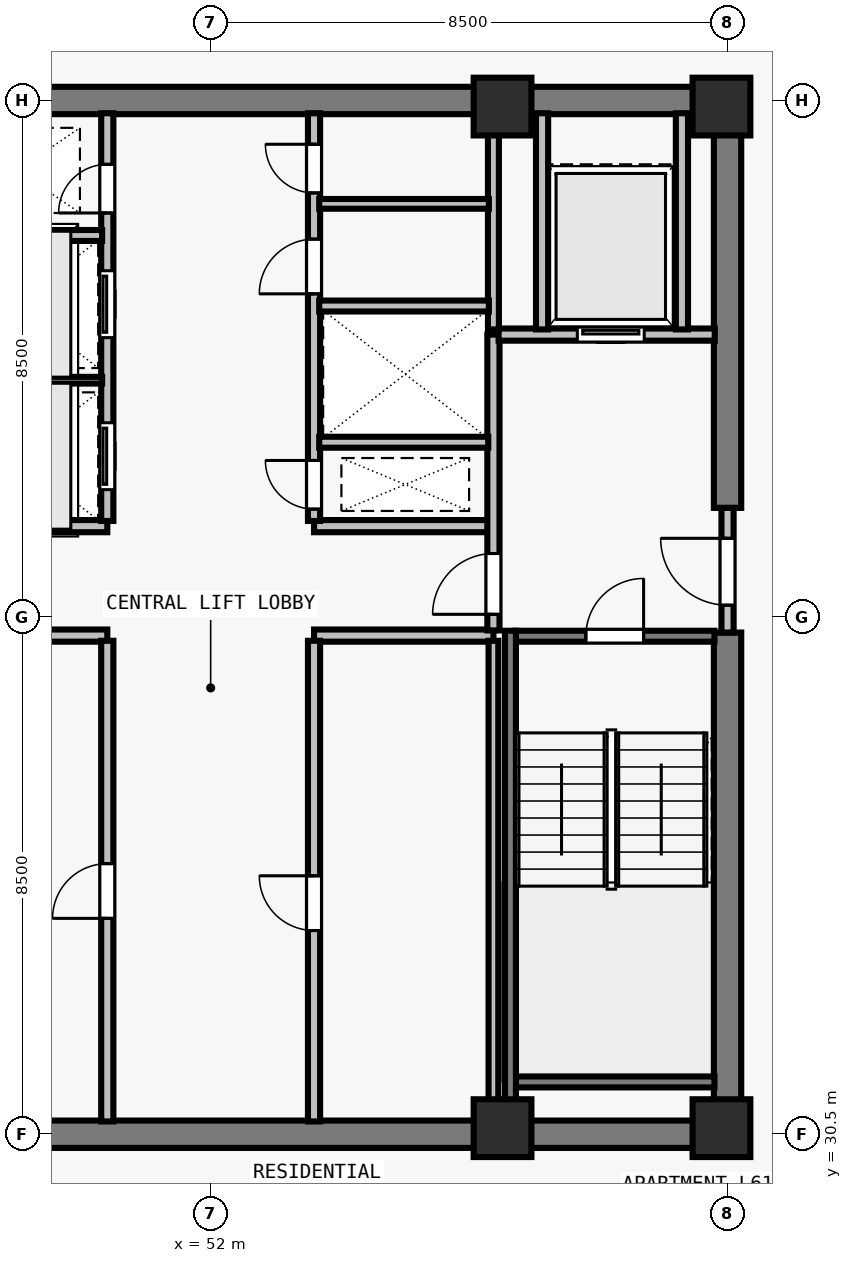
"""IFC4 building model, lengths in metres.
Left out: names, types, materials, properties, quantities, classifications, styles, units other than length and angle.
Written with IfcOpenShell. Run it as: python <this file> out.ifc"""

import sys

from ifc_helpers import new_model, si_unit, direction, frame, frame_2d, origin, origin_2d, place, context, subcontext, project, spatial, rectangle, extrude, element, fill, save


model = new_model("IFC4")
c1 = context("Model", 3, precision=1e-05, world=origin(), true_north=direction((0.0, 1.0)))
c2 = subcontext(c1, "Body", "Model", "MODEL_VIEW")
j1 = project(units=[si_unit("LENGTHUNIT", "METRE"), si_unit("PLANEANGLEUNIT", "RADIAN")], contexts=[c1])
p1 = place(None, origin())
s1 = spatial("IfcSite", under=j1, at=p1, CompositionType="ELEMENT")
p2 = place(p1, origin())
s2 = spatial("IfcBuilding", under=s1, at=p2, CompositionType="ELEMENT")
p3 = place(p2, frame((0.0, 0.0, 223.5)))
s3 = spatial("IfcBuildingStorey", under=s2, at=p3, CompositionType="ELEMENT", Elevation=223.5)
for number, where, z_axis, x_axis in (
    (1, (56.8, 30.6, 0.0), (0.0, 0.0, 1.0), (1.0, 0.0, 0.0)),
    (2, (60.4, 30.6, 0.0), (0.0, 0.0, 1.0), (1.0, 0.0, 0.0)),
    (3, (56.8, 47.4, 0.0), (0.0, 0.0, 1.0), (1.0, 0.0, 0.0)),
    (4, (60.4, 47.4, 0.0), (0.0, 0.0, 1.0), (1.0, 0.0, 0.0)),
):
    element("IfcColumn", number, at=place(p3, frame(where, z_axis=z_axis, x_axis=x_axis)), inside=s3, PredefinedType="COLUMN", context=c2, shape_type="SweptSolid", body=[
        extrude(rectangle(XDim=0.95, YDim=0.95, at=origin_2d()), origin(), (0.0, 0.0, 1.0), 3.5),
    ])
for number, where, z_axis, x_axis in (
    (5, (43.275, 30.5, 0.0), (0.0, 0.0, 1.0), (1.0, 0.0, 0.0)),
    (6, (43.275, 47.5, 0.0), (0.0, 0.0, 1.0), (1.0, 0.0, 0.0)),
):
    element("IfcWall", number, at=place(p3, frame(where, z_axis=z_axis, x_axis=x_axis)), inside=s3, PredefinedType="SHEAR", context=c2, shape_type="SweptSolid", body=[
        extrude(rectangle(XDim=17.45, YDim=0.45, at=frame_2d((8.725, 0.0))), origin(), (0.0, 0.0, 1.0), 3.29),
    ])
p4 = place(p3, frame((60.5, 30.715, 0.0), z_axis=(0.0, 0.0, 1.0), x_axis=(0.0, 1.0, 0.0)))
e7 = element("IfcWall", 7, at=p4, inside=s3, PredefinedType="SHEAR", context=c2, shape_type="SweptSolid", body=[
    extrude(rectangle(XDim=8.035, YDim=0.45, at=frame_2d((4.018, 0.0))), origin(), (0.0, 0.0, 1.0), 3.29),
])
p5 = place(p3, frame((60.5, 40.8, 0.0), z_axis=(0.0, 0.0, 1.0), x_axis=(0.0, 1.0, 0.0)))
e8 = element("IfcWall", 8, at=p5, inside=s3, PredefinedType="SHEAR", context=c2, shape_type="SweptSolid", body=[
    extrude(rectangle(XDim=6.485, YDim=0.45, at=frame_2d((3.242, 0.0))), origin(), (0.0, 0.0, 1.0), 3.29),
])
for number, where, z_axis, x_axis in (
    (9, (47.35, 38.7, 0.0), (0.0, 0.0, 1.0), (1.0, 0.0, 0.0)),
    (10, (47.35, 40.5, 0.0), (0.0, 0.0, 1.0), (1.0, 0.0, 0.0)),
    (11, (53.7, 38.7, 0.0), (0.0, 0.0, 1.0), (1.0, 0.0, 0.0)),
    (12, (53.7, 40.5, 0.0), (0.0, 0.0, 1.0), (1.0, 0.0, 0.0)),
):
    element("IfcWall", number, at=place(p3, frame(where, z_axis=z_axis, x_axis=x_axis)), inside=s3, PredefinedType="SOLIDWALL", context=c2, shape_type="SweptSolid", body=[
        extrude(rectangle(XDim=2.95, YDim=0.2, at=frame_2d((1.475, 0.0))), origin(), (0.0, 0.0, 1.0), 3.29),
    ])
p6 = place(p3, frame((50.3, 30.71, 0.0), z_axis=(0.0, 0.0, 1.0), x_axis=(0.0, 1.0, 0.0)))
e13 = element("IfcWall", 13, at=p6, inside=s3, PredefinedType="SOLIDWALL", context=c2, shape_type="SweptSolid", body=[
    extrude(rectangle(XDim=7.905, YDim=0.2, at=frame_2d((3.953, 0.0))), origin(), (0.0, 0.0, 1.0), 3.29),
])
p7 = place(p6, frame((3.34, 0.0, 0.0)))
e14 = element("IfcOpeningElement", 14, at=p7, cuts=e13, PredefinedType="OPENING", context=c2, shape_type="SweptSolid", body=[
    extrude(rectangle(XDim=0.9, YDim=2.12, at=frame_2d((0.45, 1.06))), frame((0.0, 0.11, 0.0), z_axis=(0.0, -1.0, 0.0), x_axis=(1.0, 0.0, 0.0)), (0.0, 0.0, 1.0), 0.22),
])
p8 = place(p3, frame((53.7, 30.71, 0.0), z_axis=(0.0, 0.0, 1.0), x_axis=(0.0, 1.0, 0.0)))
e15 = element("IfcWall", 15, at=p8, inside=s3, PredefinedType="SOLIDWALL", context=c2, shape_type="SweptSolid", body=[
    extrude(rectangle(XDim=7.905, YDim=0.2, at=frame_2d((3.953, 0.0))), origin(), (0.0, 0.0, 1.0), 3.29),
])
p9 = place(p8, frame((3.14, 0.0, 0.0)))
e16 = element("IfcOpeningElement", 16, at=p9, cuts=e15, PredefinedType="OPENING", context=c2, shape_type="SweptSolid", body=[
    extrude(rectangle(XDim=0.9, YDim=2.12, at=frame_2d((0.45, 1.06))), frame((0.0, 0.11, 0.0), z_axis=(0.0, -1.0, 0.0), x_axis=(1.0, 0.0, 0.0)), (0.0, 0.0, 1.0), 0.22),
])
p10 = place(p3, frame((50.3, 40.585, 0.0), z_axis=(0.0, 0.0, 1.0), x_axis=(0.0, 1.0, 0.0)))
e17 = element("IfcWall", 17, at=p10, inside=s3, PredefinedType="SOLIDWALL", context=c2, shape_type="SweptSolid", body=[
    extrude(rectangle(XDim=6.705, YDim=0.2, at=frame_2d((3.353, 0.0))), origin(), (0.0, 0.0, 1.0), 3.29),
])
p11 = place(p10, frame((0.515, 0.0, 0.0)))
e18 = element("IfcOpeningElement", 18, at=p11, cuts=e17, PredefinedType="OPENING", context=c2, shape_type="SweptSolid", body=[
    extrude(rectangle(XDim=1.1, YDim=2.2, at=frame_2d((0.55, 1.1))), frame((0.0, 0.11, 0.0), z_axis=(0.0, -1.0, 0.0), x_axis=(1.0, 0.0, 0.0)), (0.0, 0.0, 1.0), 0.22),
])
p12 = place(p10, frame((3.015, 0.0, 0.0)))
e19 = element("IfcOpeningElement", 19, at=p12, cuts=e17, PredefinedType="OPENING", context=c2, shape_type="SweptSolid", body=[
    extrude(rectangle(XDim=1.1, YDim=2.2, at=frame_2d((0.55, 1.1))), frame((0.0, 0.11, 0.0), z_axis=(0.0, -1.0, 0.0), x_axis=(1.0, 0.0, 0.0)), (0.0, 0.0, 1.0), 0.22),
])
p13 = place(p10, frame((5.065, 0.0, 0.0)))
e20 = element("IfcOpeningElement", 20, at=p13, cuts=e17, PredefinedType="OPENING", context=c2, shape_type="SweptSolid", body=[
    extrude(rectangle(XDim=0.8, YDim=2.08, at=frame_2d((0.4, 1.04))), frame((0.0, 0.11, 0.0), z_axis=(0.0, -1.0, 0.0), x_axis=(1.0, 0.0, 0.0)), (0.0, 0.0, 1.0), 0.22),
])
p14 = place(p3, frame((53.7, 40.585, 0.0), z_axis=(0.0, 0.0, 1.0), x_axis=(0.0, 1.0, 0.0)))
e21 = element("IfcWall", 21, at=p14, inside=s3, PredefinedType="SOLIDWALL", context=c2, shape_type="SweptSolid", body=[
    extrude(rectangle(XDim=6.705, YDim=0.2, at=frame_2d((3.353, 0.0))), origin(), (0.0, 0.0, 1.0), 3.29),
])
p15 = place(p14, frame((0.195, 0.0, 0.0)))
e22 = element("IfcOpeningElement", 22, at=p15, cuts=e21, PredefinedType="OPENING", context=c2, shape_type="SweptSolid", body=[
    extrude(rectangle(XDim=0.8, YDim=2.08, at=frame_2d((0.4, 1.04))), frame((0.0, 0.11, 0.0), z_axis=(0.0, -1.0, 0.0), x_axis=(1.0, 0.0, 0.0)), (0.0, 0.0, 1.0), 0.22),
])
p16 = place(p14, frame((3.735, 0.0, 0.0)))
e23 = element("IfcOpeningElement", 23, at=p16, cuts=e21, PredefinedType="OPENING", context=c2, shape_type="SweptSolid", body=[
    extrude(rectangle(XDim=0.9, YDim=2.12, at=frame_2d((0.45, 1.06))), frame((0.0, 0.11, 0.0), z_axis=(0.0, -1.0, 0.0), x_axis=(1.0, 0.0, 0.0)), (0.0, 0.0, 1.0), 0.22),
])
p17 = place(p14, frame((5.395, 0.0, 0.0)))
e24 = element("IfcOpeningElement", 24, at=p17, cuts=e21, PredefinedType="OPENING", context=c2, shape_type="SweptSolid", body=[
    extrude(rectangle(XDim=0.8, YDim=2.1, at=frame_2d((0.4, 1.05))), frame((0.0, 0.11, 0.0), z_axis=(0.0, -1.0, 0.0), x_axis=(1.0, 0.0, 0.0)), (0.0, 0.0, 1.0), 0.22),
])
p18 = place(p3, frame((60.5, 38.75, 0.0), z_axis=(0.0, 0.0, 1.0), x_axis=(0.0, 1.0, 0.0)))
e25 = element("IfcWall", 25, at=p18, inside=s3, PredefinedType="SOLIDWALL", context=c2, shape_type="SweptSolid", body=[
    extrude(rectangle(XDim=2.05, YDim=0.2, at=frame_2d((1.025, 0.0))), origin(), (0.0, 0.0, 1.0), 3.29),
])
p19 = place(p18, frame((0.45, 0.0, 0.0)))
e26 = element("IfcOpeningElement", 26, at=p19, cuts=e25, PredefinedType="OPENING", context=c2, shape_type="SweptSolid", body=[
    extrude(rectangle(XDim=1.1, YDim=2.15, at=frame_2d((0.55, 1.075))), frame((0.0, 0.11, 0.0), z_axis=(0.0, -1.0, 0.0), x_axis=(1.0, 0.0, 0.0)), (0.0, 0.0, 1.0), 0.22),
])
p20 = place(p3, frame((56.65, 38.785, 0.0), z_axis=(0.0, 0.0, 1.0), x_axis=(0.0, 1.0, 0.0)))
e27 = element("IfcWall", 27, at=p20, inside=s3, PredefinedType="SOLIDWALL", context=c2, shape_type="SweptSolid", body=[
    extrude(rectangle(XDim=4.865, YDim=0.2, at=frame_2d((2.433, 0.0))), origin(), (0.0, 0.0, 1.0), 3.29),
])
p21 = place(p20, frame((0.265, 0.0, 0.0)))
e28 = element("IfcOpeningElement", 28, at=p21, cuts=e27, PredefinedType="OPENING", context=c2, shape_type="SweptSolid", body=[
    extrude(rectangle(XDim=1.0, YDim=2.15, at=frame_2d((0.5, 1.075))), frame((0.0, 0.11, 0.0), z_axis=(0.0, -1.0, 0.0), x_axis=(1.0, 0.0, 0.0)), (0.0, 0.0, 1.0), 0.22),
])
p22 = place(p3, frame((56.735, 43.65, 0.0), z_axis=(0.0, 0.0, 1.0), x_axis=(1.0, 0.0, 0.0)))
e29 = element("IfcWall", 29, at=p22, inside=s3, PredefinedType="SOLIDWALL", context=c2, shape_type="SweptSolid", body=[
    extrude(rectangle(XDim=3.555, YDim=0.2, at=frame_2d((1.777, 0.0))), origin(), (0.0, 0.0, 1.0), 3.29),
])
p23 = place(p22, frame((1.295, 0.0, 0.0)))
e30 = element("IfcOpeningElement", 30, at=p23, cuts=e29, PredefinedType="OPENING", context=c2, shape_type="SweptSolid", body=[
    extrude(rectangle(XDim=1.1, YDim=2.2, at=frame_2d((0.55, 1.1))), frame((0.0, 0.11, 0.0), z_axis=(0.0, -1.0, 0.0), x_axis=(1.0, 0.0, 0.0)), (0.0, 0.0, 1.0), 0.22),
])
for number, where, z_axis, x_axis in (
    (31, (57.45, 43.735, 0.0), (0.0, 0.0, 1.0), (0.0, 1.0, 0.0)),
    (32, (59.75, 43.735, 0.0), (0.0, 0.0, 1.0), (0.0, 1.0, 0.0)),
):
    element("IfcWall", number, at=place(p3, frame(where, z_axis=z_axis, x_axis=x_axis)), inside=s3, PredefinedType="SOLIDWALL", context=c2, shape_type="SweptSolid", body=[
        extrude(rectangle(XDim=3.555, YDim=0.2, at=frame_2d((1.777, 0.0))), origin(), (0.0, 0.0, 1.0), 3.29),
    ])
p24 = place(p3, frame((56.65, 30.71, 0.0), z_axis=(0.0, 0.0, 1.0), x_axis=(0.0, 1.0, 0.0)))
e33 = element("IfcWall", 33, at=p24, inside=s3, PredefinedType="PARTITIONING", context=c2, shape_type="SweptSolid", body=[
    extrude(rectangle(XDim=7.905, YDim=0.16, at=frame_2d((3.953, 0.0))), origin(), (0.0, 0.0, 1.0), 3.29),
])
p25 = place(p3, frame((47.435, 42.9, 0.0), z_axis=(0.0, 0.0, 1.0), x_axis=(1.0, 0.0, 0.0)))
e34 = element("IfcWall", 34, at=p25, inside=s3, PredefinedType="PARTITIONING", context=c2, shape_type="SweptSolid", body=[
    extrude(rectangle(XDim=2.78, YDim=0.11, at=frame_2d((1.39, 0.0))), origin(), (0.0, 0.0, 1.0), 3.29),
])
p26 = place(p3, frame((47.425, 45.28, 0.0), z_axis=(0.0, 0.0, 1.0), x_axis=(1.0, 0.0, 0.0)))
e35 = element("IfcWall", 35, at=p26, inside=s3, PredefinedType="SOLIDWALL", context=c2, shape_type="SweptSolid", body=[
    extrude(rectangle(XDim=2.79, YDim=0.18, at=frame_2d((1.395, 0.0))), origin(), (0.0, 0.0, 1.0), 3.29),
])
p27 = place(p3, frame((56.65, 43.735, 0.0), z_axis=(0.0, 0.0, 1.0), x_axis=(0.0, 1.0, 0.0)))
e36 = element("IfcWall", 36, at=p27, inside=s3, PredefinedType="SOLIDWALL", context=c2, shape_type="SweptSolid", body=[
    extrude(rectangle(XDim=3.555, YDim=0.18, at=frame_2d((1.777, 0.0))), origin(), (0.0, 0.0, 1.0), 3.29),
])
p28 = place(p3, frame((53.785, 41.88, 0.0), z_axis=(0.0, 0.0, 1.0), x_axis=(1.0, 0.0, 0.0)))
e37 = element("IfcWall", 37, at=p28, inside=s3, PredefinedType="SOLIDWALL", context=c2, shape_type="SweptSolid", body=[
    extrude(rectangle(XDim=2.78, YDim=0.18, at=frame_2d((1.39, 0.0))), origin(), (0.0, 0.0, 1.0), 3.29),
])
p29 = place(p3, frame((53.785, 44.12, 0.0), z_axis=(0.0, 0.0, 1.0), x_axis=(1.0, 0.0, 0.0)))
e38 = element("IfcWall", 38, at=p29, inside=s3, PredefinedType="SOLIDWALL", context=c2, shape_type="SweptSolid", body=[
    extrude(rectangle(XDim=2.79, YDim=0.18, at=frame_2d((1.395, 0.0))), origin(), (0.0, 0.0, 1.0), 3.29),
])
p30 = place(p3, frame((53.785, 45.8, 0.0), z_axis=(0.0, 0.0, 1.0), x_axis=(1.0, 0.0, 0.0)))
e39 = element("IfcWall", 39, at=p30, inside=s3, PredefinedType="PARTITIONING", context=c2, shape_type="SweptSolid", body=[
    extrude(rectangle(XDim=2.79, YDim=0.16, at=frame_2d((1.395, 0.0))), origin(), (0.0, 0.0, 1.0), 3.29),
])
p31 = place(p3, frame((57.005, 38.69, 0.0), z_axis=(0.0, 0.0, 1.0), x_axis=(1.0, 0.0, 0.0)))
e40 = element("IfcWall", 40, at=p31, inside=s3, PredefinedType="SOLIDWALL", context=c2, shape_type="SweptSolid", body=[
    extrude(rectangle(XDim=3.28, YDim=0.18, at=frame_2d((1.64, 0.0))), origin(), (0.0, 0.0, 1.0), 3.29),
])
p32 = place(p31, frame((1.165, 0.0, 0.0)))
e41 = element("IfcOpeningElement", 41, at=p32, cuts=e40, PredefinedType="OPENING", context=c2, shape_type="SweptSolid", body=[
    extrude(rectangle(XDim=0.95, YDim=2.15, at=frame_2d((0.475, 1.075))), frame((0.0, 0.1, 0.0), z_axis=(0.0, -1.0, 0.0), x_axis=(1.0, 0.0, 0.0)), (0.0, 0.0, 1.0), 0.2),
])
p33 = place(p3, frame((57.005, 31.36, 0.0), z_axis=(0.0, 0.0, 1.0), x_axis=(1.0, 0.0, 0.0)))
e42 = element("IfcWall", 42, at=p33, inside=s3, PredefinedType="SOLIDWALL", context=c2, shape_type="SweptSolid", body=[
    extrude(rectangle(XDim=3.28, YDim=0.18, at=frame_2d((1.64, 0.0))), origin(), (0.0, 0.0, 1.0), 3.29),
])
p34 = place(p3, frame((56.93, 38.78, 0.0), z_axis=(0.0, 0.0, 1.0), x_axis=(0.0, -1.0, 0.0)))
e43 = element("IfcWall", 43, at=p34, inside=s3, PredefinedType="SOLIDWALL", context=c2, shape_type="SweptSolid", body=[
    extrude(rectangle(XDim=8.067, YDim=0.18, at=frame_2d((4.034, 0.0))), origin(), (0.0, 0.0, 1.0), 3.29),
])
p35 = place(p19, origin())
e44 = element("IfcDoor", 44, at=p35, inside=s3, OperationType="SINGLE_SWING_RIGHT", PredefinedType="DOOR", context=c2, shape_type="SweptSolid", body=[
    extrude(rectangle(XDim=1.1, YDim=2.15, at=frame_2d((0.55, 1.075))), frame((0.0, 0.025, 0.0), z_axis=(0.0, -1.0, 0.0), x_axis=(1.0, 0.0, 0.0)), (0.0, 0.0, 1.0), 0.05),
])
fill(e26, e44)
p36 = place(p21, origin())
e45 = element("IfcDoor", 45, at=p36, inside=s3, OperationType="SINGLE_SWING_LEFT", PredefinedType="DOOR", context=c2, shape_type="SweptSolid", body=[
    extrude(rectangle(XDim=1.0, YDim=2.15, at=frame_2d((0.5, 1.075))), frame((0.0, 0.025, 0.0), z_axis=(0.0, -1.0, 0.0), x_axis=(1.0, 0.0, 0.0)), (0.0, 0.0, 1.0), 0.05),
])
fill(e28, e45)
p37 = place(p23, origin())
e46 = element("IfcDoor", 46, at=p37, inside=s3, OperationType="SLIDING_TO_LEFT", PredefinedType="DOOR", context=c2, shape_type="SweptSolid", body=[
    extrude(rectangle(XDim=1.1, YDim=2.2, at=frame_2d((0.55, 1.1))), frame((0.0, 0.025, 0.0), z_axis=(0.0, -1.0, 0.0), x_axis=(1.0, 0.0, 0.0)), (0.0, 0.0, 1.0), 0.05),
])
fill(e30, e46)
p38 = place(p7, origin())
e47 = element("IfcDoor", 47, at=p38, inside=s3, OperationType="SINGLE_SWING_LEFT", PredefinedType="DOOR", context=c2, shape_type="SweptSolid", body=[
    extrude(rectangle(XDim=0.9, YDim=2.12, at=frame_2d((0.45, 1.06))), frame((0.0, 0.025, 0.0), z_axis=(0.0, -1.0, 0.0), x_axis=(1.0, 0.0, 0.0)), (0.0, 0.0, 1.0), 0.05),
])
fill(e14, e47)
p39 = place(p9, origin())
e48 = element("IfcDoor", 48, at=p39, inside=s3, OperationType="SINGLE_SWING_RIGHT", PredefinedType="DOOR", context=c2, shape_type="SweptSolid", body=[
    extrude(rectangle(XDim=0.9, YDim=2.12, at=frame_2d((0.45, 1.06))), frame((0.0, 0.025, 0.0), z_axis=(0.0, -1.0, 0.0), x_axis=(1.0, 0.0, 0.0)), (0.0, 0.0, 1.0), 0.05),
])
fill(e16, e48)
p40 = place(p11, origin())
e49 = element("IfcDoor", 49, at=p40, inside=s3, OperationType="SLIDING_TO_LEFT", PredefinedType="DOOR", context=c2, shape_type="SweptSolid", body=[
    extrude(rectangle(XDim=1.1, YDim=2.2, at=frame_2d((0.55, 1.1))), frame((0.0, 0.025, 0.0), z_axis=(0.0, -1.0, 0.0), x_axis=(1.0, 0.0, 0.0)), (0.0, 0.0, 1.0), 0.05),
])
fill(e18, e49)
p41 = place(p12, origin())
e50 = element("IfcDoor", 50, at=p41, inside=s3, OperationType="SLIDING_TO_LEFT", PredefinedType="DOOR", context=c2, shape_type="SweptSolid", body=[
    extrude(rectangle(XDim=1.1, YDim=2.2, at=frame_2d((0.55, 1.1))), frame((0.0, 0.025, 0.0), z_axis=(0.0, -1.0, 0.0), x_axis=(1.0, 0.0, 0.0)), (0.0, 0.0, 1.0), 0.05),
])
fill(e19, e50)
p42 = place(p13, origin())
e51 = element("IfcDoor", 51, at=p42, inside=s3, OperationType="SINGLE_SWING_LEFT", PredefinedType="DOOR", context=c2, shape_type="SweptSolid", body=[
    extrude(rectangle(XDim=0.8, YDim=2.08, at=frame_2d((0.4, 1.04))), frame((0.0, 0.025, 0.0), z_axis=(0.0, -1.0, 0.0), x_axis=(1.0, 0.0, 0.0)), (0.0, 0.0, 1.0), 0.05),
])
fill(e20, e51)
p43 = place(p15, origin())
e52 = element("IfcDoor", 52, at=p43, inside=s3, OperationType="SINGLE_SWING_RIGHT", PredefinedType="DOOR", context=c2, shape_type="SweptSolid", body=[
    extrude(rectangle(XDim=0.8, YDim=2.08, at=frame_2d((0.4, 1.04))), frame((0.0, 0.025, 0.0), z_axis=(0.0, -1.0, 0.0), x_axis=(1.0, 0.0, 0.0)), (0.0, 0.0, 1.0), 0.05),
])
fill(e22, e52)
p44 = place(p16, origin())
e53 = element("IfcDoor", 53, at=p44, inside=s3, OperationType="SINGLE_SWING_LEFT", PredefinedType="DOOR", context=c2, shape_type="SweptSolid", body=[
    extrude(rectangle(XDim=0.9, YDim=2.12, at=frame_2d((0.45, 1.06))), frame((0.0, 0.025, 0.0), z_axis=(0.0, -1.0, 0.0), x_axis=(1.0, 0.0, 0.0)), (0.0, 0.0, 1.0), 0.05),
])
fill(e23, e53)
p45 = place(p17, origin())
e54 = element("IfcDoor", 54, at=p45, inside=s3, OperationType="SINGLE_SWING_RIGHT", PredefinedType="DOOR", context=c2, shape_type="SweptSolid", body=[
    extrude(rectangle(XDim=0.8, YDim=2.1, at=frame_2d((0.4, 1.05))), frame((0.0, 0.025, 0.0), z_axis=(0.0, -1.0, 0.0), x_axis=(1.0, 0.0, 0.0)), (0.0, 0.0, 1.0), 0.05),
])
fill(e24, e54)
p46 = place(p32, origin())
e55 = element("IfcDoor", 55, at=p46, inside=s3, OperationType="SINGLE_SWING_RIGHT", PredefinedType="DOOR", context=c2, shape_type="SweptSolid", body=[
    extrude(rectangle(XDim=0.95, YDim=2.15, at=frame_2d((0.475, 1.075))), frame((0.0, 0.025, 0.0), z_axis=(0.0, -1.0, 0.0), x_axis=(1.0, 0.0, 0.0)), (0.0, 0.0, 1.0), 0.05),
])
fill(e41, e55)
save(model, sys.argv[1])
